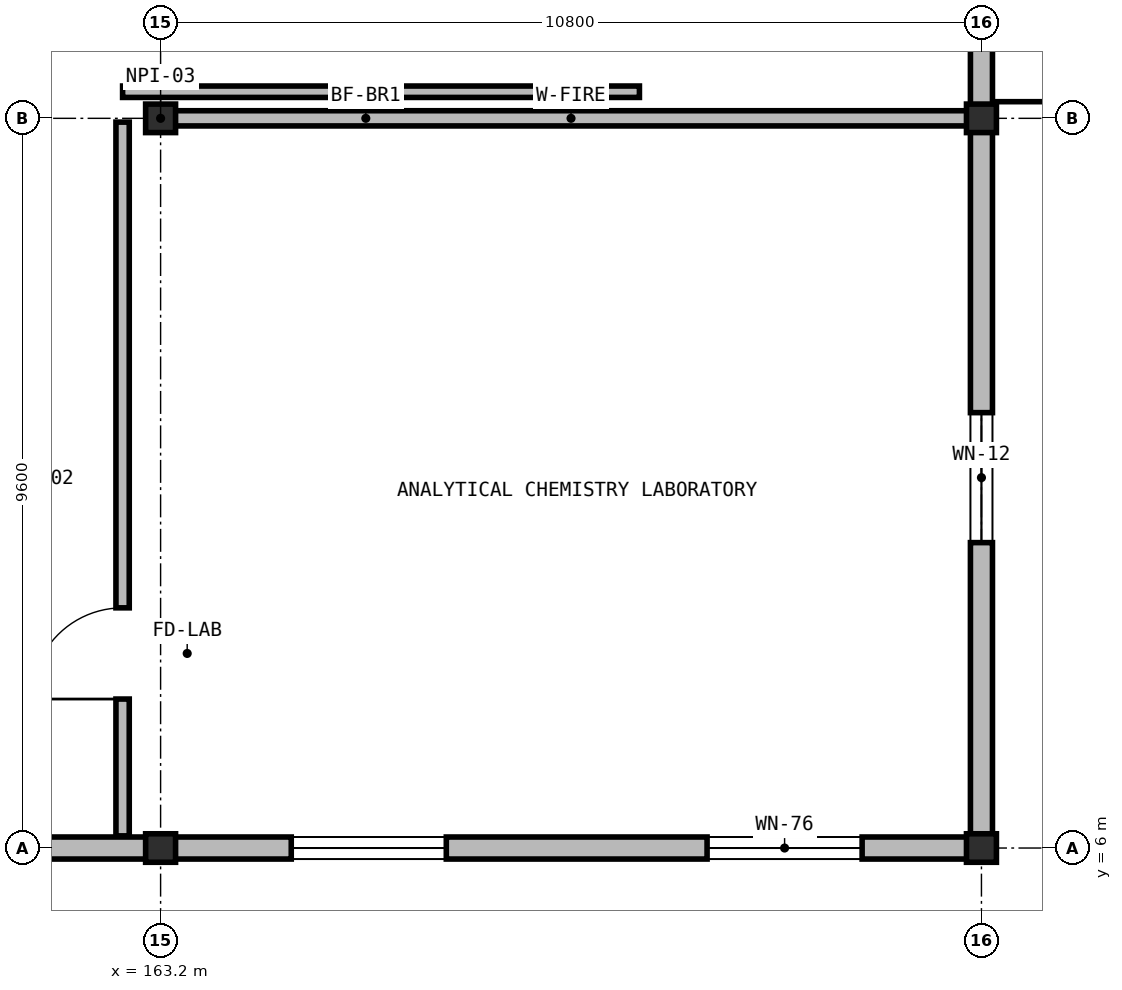
"""IFC4 building model, lengths in metres.
Left out: names, types, materials, properties, quantities, classifications, styles, units other than length and angle.
Written with IfcOpenShell. Run it as: python <this file> out.ifc"""

import sys

from ifc_helpers import new_model, si_unit, direction, frame, frame_2d, origin, origin_2d, place, context, subcontext, project, spatial, rectangle, i_section, extrude, element, fill, save


model = new_model("IFC4")
c1 = context("Model", 3, precision=1e-05, world=origin(), true_north=direction((0.0, 1.0)))
c2 = subcontext(c1, "Body", "Model", "MODEL_VIEW")
j1 = project(units=[si_unit("LENGTHUNIT", "METRE"), si_unit("PLANEANGLEUNIT", "RADIAN")], contexts=[c1])
p1 = place(None, origin())
s1 = spatial("IfcSite", under=j1, at=p1, CompositionType="ELEMENT")
p2 = place(p1, origin())
s2 = spatial("IfcBuilding", under=s1, at=p2, CompositionType="ELEMENT")
p3 = place(p2, frame((0.0, 0.0, 9.8)))
s3 = spatial("IfcBuildingStorey", under=s2, at=p3, CompositionType="ELEMENT", Elevation=9.8)
for number, where, z_axis, x_axis in (
    (1, (163.2, 6.0, 0.0), (0.0, 0.0, 1.0), (1.0, 0.0, 0.0)),
    (2, (163.2, 15.6, 0.0), (0.0, 0.0, 1.0), (1.0, 0.0, 0.0)),
    (3, (174.0, 6.0, 0.0), (0.0, 0.0, 1.0), (1.0, 0.0, 0.0)),
    (4, (174.0, 15.6, 0.0), (0.0, 0.0, 1.0), (1.0, 0.0, 0.0)),
):
    element("IfcColumn", number, at=place(p3, frame(where, z_axis=z_axis, x_axis=x_axis)), inside=s3, PredefinedType="COLUMN", context=c2, shape_type="SweptSolid", body=[
        extrude(i_section(OverallWidth=0.394, OverallDepth=0.375, WebThickness=0.02, FlangeThickness=0.032, at=origin_2d()), origin(), (0.0, 0.0, 1.0), 4.55),
    ])
p4 = place(p3, frame((174.0, 25.196, 0.0), z_axis=(0.0, 0.0, 1.0), x_axis=(0.0, -1.0, 0.0)))
e5 = element("IfcWall", 5, at=p4, inside=s3, PredefinedType="SOLIDWALL", context=c2, shape_type="SweptSolid", body=[
    extrude(rectangle(XDim=9.592, YDim=0.29, at=frame_2d((4.796, 0.0))), origin(), (0.0, 0.0, 1.0), 3.884),
])
p5 = place(p4, frame((4.106, 0.0, 0.95)))
e6 = element("IfcOpeningElement", 6, at=p5, cuts=e5, PredefinedType="OPENING", context=c2, shape_type="SweptSolid", body=[
    extrude(rectangle(XDim=1.38, YDim=1.56, at=frame_2d((0.69, 0.78))), frame((0.0, 0.155, 0.0), z_axis=(0.0, -1.0, 0.0), x_axis=(1.0, 0.0, 0.0)), (0.0, 0.0, 1.0), 0.31),
])
p6 = place(p3, frame((174.0, 15.596, 0.0), z_axis=(0.0, 0.0, 1.0), x_axis=(0.0, -1.0, 0.0)))
e7 = element("IfcWall", 7, at=p6, inside=s3, PredefinedType="SOLIDWALL", context=c2, shape_type="SweptSolid", body=[
    extrude(rectangle(XDim=9.447, YDim=0.29, at=frame_2d((4.724, 0.0))), origin(), (0.0, 0.0, 1.0), 3.884),
])
p7 = place(p6, frame((3.868, 0.0, 0.95)))
e8 = element("IfcOpeningElement", 8, at=p7, cuts=e7, PredefinedType="OPENING", context=c2, shape_type="SweptSolid", body=[
    extrude(rectangle(XDim=1.71, YDim=1.48, at=frame_2d((0.855, 0.74))), frame((0.0, 0.155, 0.0), z_axis=(0.0, -1.0, 0.0), x_axis=(1.0, 0.0, 0.0)), (0.0, 0.0, 1.0), 0.31),
])
p8 = place(p3, frame((174.145, 6.0, 0.0), z_axis=(0.0, 0.0, 1.0), x_axis=(-1.0, 0.0, 0.0)))
e9 = element("IfcWall", 9, at=p8, inside=s3, PredefinedType="SOLIDWALL", context=c2, shape_type="SweptSolid", body=[
    extrude(rectangle(XDim=10.941, YDim=0.29, at=frame_2d((5.47, 0.0))), origin(), (0.0, 0.0, 1.0), 3.814),
])
p9 = place(p8, frame((1.715, 0.0, 0.95)))
e10 = element("IfcOpeningElement", 10, at=p9, cuts=e9, PredefinedType="OPENING", context=c2, shape_type="SweptSolid", body=[
    extrude(rectangle(XDim=2.04, YDim=1.4, at=frame_2d((1.02, 0.7))), frame((0.0, 0.155, 0.0), z_axis=(0.0, -1.0, 0.0), x_axis=(1.0, 0.0, 0.0)), (0.0, 0.0, 1.0), 0.31),
])
p10 = place(p8, frame((7.186, 0.0, 0.95)))
e11 = element("IfcOpeningElement", 11, at=p10, cuts=e9, PredefinedType="OPENING", context=c2, shape_type="SweptSolid", body=[
    extrude(rectangle(XDim=2.04, YDim=1.4, at=frame_2d((1.02, 0.7))), frame((0.0, 0.155, 0.0), z_axis=(0.0, -1.0, 0.0), x_axis=(1.0, 0.0, 0.0)), (0.0, 0.0, 1.0), 0.31),
])
p11 = place(p3, frame((163.196, 6.0, 0.0), z_axis=(0.0, 0.0, 1.0), x_axis=(-1.0, 0.0, 0.0)))
e12 = element("IfcWall", 12, at=p11, inside=s3, PredefinedType="SOLIDWALL", context=c2, shape_type="SweptSolid", body=[
    extrude(rectangle(XDim=9.741, YDim=0.29, at=frame_2d((4.871, 0.0))), origin(), (0.0, 0.0, 1.0), 3.884),
])
p12 = place(p11, frame((5.956, 0.0, 0.95)))
e13 = element("IfcOpeningElement", 13, at=p12, cuts=e12, PredefinedType="OPENING", context=c2, shape_type="SweptSolid", body=[
    extrude(rectangle(XDim=2.7, YDim=1.72, at=frame_2d((1.35, 0.86))), frame((0.0, 0.155, 0.0), z_axis=(0.0, -1.0, 0.0), x_axis=(1.0, 0.0, 0.0)), (0.0, 0.0, 1.0), 0.31),
])
p13 = place(p3, frame((163.36, 15.6, 0.0), z_axis=(0.0, 0.0, 1.0), x_axis=(1.0, 0.0, 0.0)))
e14 = element("IfcWall", 14, at=p13, inside=s3, PredefinedType="SOLIDWALL", context=c2, shape_type="SweptSolid", body=[
    extrude(rectangle(XDim=10.48, YDim=0.2, at=frame_2d((5.24, 0.0))), origin(), (0.0, 0.0, 1.0), 3.737),
])
p14 = place(p3, frame((162.7, 6.16, 0.0), z_axis=(0.0, 0.0, 1.0), x_axis=(0.0, 1.0, 0.0)))
e15 = element("IfcWall", 15, at=p14, inside=s3, PredefinedType="PARTITIONING", context=c2, shape_type="SweptSolid", body=[
    extrude(rectangle(XDim=9.39, YDim=0.175, at=frame_2d((4.695, 0.0))), origin(), (0.0, 0.0, 1.0), 4.3),
])
p15 = place(p14, frame((1.8, 0.0, 0.0)))
e16 = element("IfcOpeningElement", 16, at=p15, cuts=e15, PredefinedType="OPENING", context=c2, shape_type="SweptSolid", body=[
    extrude(rectangle(XDim=1.2, YDim=2.2, at=frame_2d((0.6, 1.1))), frame((0.0, 0.097, 0.0), z_axis=(0.0, -1.0, 0.0), x_axis=(1.0, 0.0, 0.0)), (0.0, 0.0, 1.0), 0.195),
])
p16 = place(p3, frame((162.7, 15.95, 0.0), z_axis=(0.0, 0.0, 1.0), x_axis=(1.0, 0.0, 0.0)))
e17 = element("IfcWall", 17, at=p16, inside=s3, PredefinedType="PARTITIONING", context=c2, shape_type="SweptSolid", body=[
    extrude(rectangle(XDim=6.8, YDim=0.15, at=frame_2d((3.4, 0.0))), origin(), (0.0, 0.0, 1.0), 4.3),
])
p17 = place(p7, origin())
e18 = element("IfcWindow", 18, at=p17, inside=s3, PartitioningType="SINGLE_PANEL", PredefinedType="WINDOW", context=c2, shape_type="SweptSolid", body=[
    extrude(rectangle(XDim=1.71, YDim=1.48, at=frame_2d((0.855, 0.74))), frame((0.0, 0.03, 0.0), z_axis=(0.0, -1.0, 0.0), x_axis=(1.0, 0.0, 0.0)), (0.0, 0.0, 1.0), 0.06),
])
fill(e8, e18)
p18 = place(p9, origin())
e19 = element("IfcWindow", 19, at=p18, inside=s3, PartitioningType="SINGLE_PANEL", PredefinedType="WINDOW", context=c2, shape_type="SweptSolid", body=[
    extrude(rectangle(XDim=2.04, YDim=1.4, at=frame_2d((1.02, 0.7))), frame((0.0, 0.03, 0.0), z_axis=(0.0, -1.0, 0.0), x_axis=(1.0, 0.0, 0.0)), (0.0, 0.0, 1.0), 0.06),
])
fill(e10, e19)
p19 = place(p10, origin())
e20 = element("IfcWindow", 20, at=p19, inside=s3, PartitioningType="SINGLE_PANEL", PredefinedType="WINDOW", context=c2, shape_type="SweptSolid", body=[
    extrude(rectangle(XDim=2.04, YDim=1.4, at=frame_2d((1.02, 0.7))), frame((0.0, 0.03, 0.0), z_axis=(0.0, -1.0, 0.0), x_axis=(1.0, 0.0, 0.0)), (0.0, 0.0, 1.0), 0.06),
])
fill(e11, e20)
p20 = place(p15, origin())
e21 = element("IfcDoor", 21, at=p20, inside=s3, OperationType="SINGLE_SWING_LEFT", PredefinedType="DOOR", context=c2, shape_type="SweptSolid", body=[
    extrude(rectangle(XDim=1.2, YDim=2.2, at=frame_2d((0.6, 1.1))), frame((0.0, 0.025, 0.0), z_axis=(0.0, -1.0, 0.0), x_axis=(1.0, 0.0, 0.0)), (0.0, 0.0, 1.0), 0.05),
])
fill(e16, e21)
save(model, sys.argv[1])
